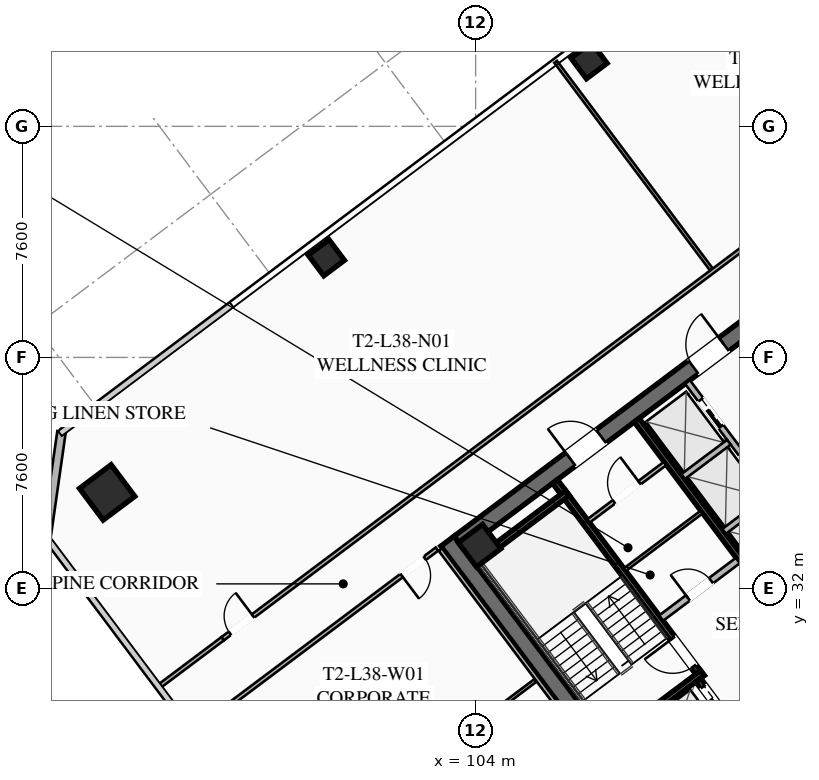
"""IFC4 building model, lengths in metres.
Left out: names, types, materials, properties, quantities, classifications, styles, units other than length and angle.
Written with IfcOpenShell. Run it as: python <this file> out.ifc"""

import sys

from ifc_helpers import new_model, si_unit, direction, frame, frame_2d, origin, origin_2d, place, context, subcontext, project, spatial, rectangle, hollow_rectangle, extrude, element, fill, save


model = new_model("IFC4")
c1 = context("Model", 3, precision=1e-05, world=origin(), true_north=direction((0.0, 1.0)))
c2 = subcontext(c1, "Body", "Model", "MODEL_VIEW")
j1 = project(units=[si_unit("LENGTHUNIT", "METRE"), si_unit("PLANEANGLEUNIT", "RADIAN")], contexts=[c1])
p1 = place(None, origin())
s1 = spatial("IfcSite", under=j1, at=p1, CompositionType="ELEMENT")
p2 = place(p1, origin())
s2 = spatial("IfcBuilding", under=s1, at=p2, CompositionType="ELEMENT")
p3 = place(p2, frame((0.0, 0.0, 142.8)))
s3 = spatial("IfcBuildingStorey", under=s2, at=p3, CompositionType="ELEMENT", Elevation=142.8)
p4 = place(p3, frame((112.436, 21.077, 0.0), z_axis=(0.0, 0.0, 1.0), x_axis=(-0.600005007985, 0.799996243986, 0.0)))
e1 = element("IfcWall", 1, at=p4, inside=s3, PredefinedType="SHEAR", context=c2, shape_type="SweptSolid", body=[
    extrude(rectangle(XDim=15.6, YDim=0.55, at=frame_2d((7.8, 0.0))), origin(), (0.0, 0.0, 1.0), 3.55),
])
p5 = place(p3, frame((124.539, 30.498, 0.0), z_axis=(0.0, 0.0, 1.0), x_axis=(-0.799998054672, -0.600002593761, 0.0)))
e2 = element("IfcWall", 2, at=p5, inside=s3, PredefinedType="SHEAR", context=c2, shape_type="SweptSolid", body=[
    extrude(rectangle(XDim=15.06, YDim=0.55, at=frame_2d((7.53, 0.0))), origin(), (0.0, 0.0, 1.0), 3.55),
])
p6 = place(p5, frame((9.23, 0.0, 0.0)))
e3 = element("IfcOpeningElement", 3, at=p6, cuts=e2, PredefinedType="OPENING", context=c2, shape_type="SweptSolid", body=[
    extrude(rectangle(XDim=1.25, YDim=2.25, at=frame_2d((0.625, 1.125))), frame((0.0, 0.285, 0.0), z_axis=(0.0, -1.0, 0.0), x_axis=(1.0, 0.0, 0.0)), (0.0, 0.0, 1.0), 0.57),
])
p7 = place(p5, frame((4.18, 0.0, 0.0)))
e4 = element("IfcOpeningElement", 4, at=p7, cuts=e2, PredefinedType="OPENING", context=c2, shape_type="SweptSolid", body=[
    extrude(rectangle(XDim=1.25, YDim=2.25, at=frame_2d((0.625, 1.125))), frame((0.0, 0.285, 0.0), z_axis=(0.0, -1.0, 0.0), x_axis=(1.0, 0.0, 0.0)), (0.0, 0.0, 1.0), 0.57),
])
p8 = place(p3, frame((103.461, 33.502, 0.0), z_axis=(0.0, 0.0, 1.0), x_axis=(0.799998054672, 0.600002593761, 0.0)))
e5 = element("IfcWall", 5, at=p8, inside=s3, PredefinedType="SHEAR", context=c2, shape_type="SweptSolid", body=[
    extrude(rectangle(XDim=15.06, YDim=0.55, at=frame_2d((7.53, 0.0))), origin(), (0.0, 0.0, 1.0), 3.55),
])
p9 = place(p8, frame((4.58, 0.0, 0.0)))
e6 = element("IfcOpeningElement", 6, at=p9, cuts=e5, PredefinedType="OPENING", context=c2, shape_type="SweptSolid", body=[
    extrude(rectangle(XDim=1.25, YDim=2.25, at=frame_2d((0.625, 1.125))), frame((0.0, 0.285, 0.0), z_axis=(0.0, -1.0, 0.0), x_axis=(1.0, 0.0, 0.0)), (0.0, 0.0, 1.0), 0.57),
])
p10 = place(p8, frame((9.63, 0.0, 0.0)))
e7 = element("IfcOpeningElement", 7, at=p10, cuts=e5, PredefinedType="OPENING", context=c2, shape_type="SweptSolid", body=[
    extrude(rectangle(XDim=1.25, YDim=2.25, at=frame_2d((0.625, 1.125))), frame((0.0, 0.285, 0.0), z_axis=(0.0, -1.0, 0.0), x_axis=(1.0, 0.0, 0.0)), (0.0, 0.0, 1.0), 0.57),
])
p11 = place(p3, frame((104.13, 33.41, 0.0), z_axis=(0.0, 0.0, 1.0), x_axis=(0.799999996291, 0.600000004945, 0.0)))
e8 = element("IfcColumn", 8, at=p11, inside=s3, PredefinedType="COLUMN", context=c2, shape_type="SweptSolid", body=[
    extrude(hollow_rectangle(XDim=1.0, YDim=1.0, WallThickness=0.04, at=origin_2d()), origin(), (0.0, 0.0, 1.0), 3.37),
])
p12 = place(p3, frame((91.88, 35.16, 0.0), z_axis=(0.0, 0.0, 1.0), x_axis=(0.799999996291, 0.600000004945, 0.0)))
e9 = element("IfcColumn", 9, at=p12, inside=s3, PredefinedType="COLUMN", context=c2, shape_type="SweptSolid", body=[
    extrude(hollow_rectangle(XDim=1.3, YDim=1.3, WallThickness=0.05, at=origin_2d()), origin(), (0.0, 0.0, 1.0), 3.37),
])
for number, where, z_axis, x_axis in (
    (10, (107.73, 49.36, 0.0), (0.0, 0.0, 1.0), (0.8, 0.6, 0.0)),
    (11, (99.09, 42.88, 0.0), (0.0, 0.0, 1.0), (0.8, 0.6, 0.0)),
):
    element("IfcColumn", number, at=place(p3, frame(where, z_axis=z_axis, x_axis=x_axis)), inside=s3, PredefinedType="COLUMN", context=c2, shape_type="SweptSolid", body=[
        extrude(hollow_rectangle(XDim=0.85, YDim=0.85, WallThickness=0.035, at=origin_2d()), origin(), (0.0, 0.0, 1.0), 3.37),
    ])
p13 = place(p3, frame((89.88, 33.66, 0.0), z_axis=(0.0, 0.0, 1.0), x_axis=(0.141421356237, 0.989949493661, 0.0)))
e12 = element("IfcWall", 12, at=p13, inside=s3, PredefinedType="SOLIDWALL", context=c2, shape_type="SweptSolid", body=[
    extrude(rectangle(XDim=3.536, YDim=0.28, at=frame_2d((1.768, 0.0))), origin(), (0.0, 0.0, 1.0), 3.37),
])
p14 = place(p3, frame((111.44, 29.08, 0.0), z_axis=(0.0, 0.0, 1.0), x_axis=(-0.59999029481, 0.8000072788, 0.0)))
e13 = element("IfcWall", 13, at=p14, inside=s3, PredefinedType="SHEAR", context=c2, shape_type="SweptSolid", body=[
    extrude(rectangle(XDim=8.05, YDim=0.2, at=frame_2d((4.025, 0.0))), origin(), (0.0, 0.0, 1.0), 3.37),
])
p15 = place(p14, frame((0.45, 0.0, 0.0)))
e14 = element("IfcOpeningElement", 14, at=p15, cuts=e13, PredefinedType="OPENING", context=c2, shape_type="SweptSolid", body=[
    extrude(rectangle(XDim=1.15, YDim=2.2, at=frame_2d((0.575, 1.1))), frame((0.0, 0.11, 0.0), z_axis=(0.0, -1.0, 0.0), x_axis=(1.0, 0.0, 0.0)), (0.0, 0.0, 1.0), 0.22),
])
for number, where, z_axis, x_axis in (
    (15, (108.396, 26.922, 0.0), (0.0, 0.0, 1.0), (0.8, 0.6, 0.0)),
    (16, (103.956, 32.842, 0.0), (0.0, 0.0, 1.0), (0.8, 0.6, 0.0)),
):
    element("IfcWall", number, at=place(p3, frame(where, z_axis=z_axis, x_axis=x_axis)), inside=s3, PredefinedType="SHEAR", context=c2, shape_type="SweptSolid", body=[
        extrude(rectangle(XDim=3.83, YDim=0.2, at=frame_2d((1.915, 0.0))), origin(), (0.0, 0.0, 1.0), 3.37),
    ])
p16 = place(p3, frame((117.998, 25.936, 0.0), z_axis=(0.0, 0.0, 1.0), x_axis=(-0.600002693989, 0.799997979501, 0.0)))
e17 = element("IfcWall", 17, at=p16, inside=s3, PredefinedType="SHEAR", context=c2, shape_type="SweptSolid", body=[
    extrude(rectangle(XDim=14.5, YDim=0.2, at=frame_2d((7.25, 0.0))), origin(), (0.0, 0.0, 1.0), 3.37),
])
p17 = place(p3, frame((110.104, 31.028, 0.0), z_axis=(0.0, 0.0, 1.0), x_axis=(0.800018601094, 0.59997519774, 0.0)))
e18 = element("IfcWall", 18, at=p17, inside=s3, PredefinedType="SOLIDWALL", context=c2, shape_type="SweptSolid", body=[
    extrude(rectangle(XDim=3.15, YDim=0.22, at=frame_2d((1.575, 0.0))), origin(), (0.0, 0.0, 1.0), 2.723),
])
p18 = place(p17, frame((1.1, 0.0, 0.0)))
e19 = element("IfcOpeningElement", 19, at=p18, cuts=e18, PredefinedType="OPENING", context=c2, shape_type="SweptSolid", body=[
    extrude(rectangle(XDim=0.95, YDim=2.05, at=frame_2d((0.475, 1.025))), frame((0.0, 0.12, 0.0), z_axis=(0.0, -1.0, 0.0), x_axis=(1.0, 0.0, 0.0)), (0.0, 0.0, 1.0), 0.24),
])
p19 = place(p3, frame((115.19, 23.83, 0.0), z_axis=(0.0, 0.0, 1.0), x_axis=(-0.599993943644, 0.800004542231, 0.0)))
e20 = element("IfcWall", 20, at=p19, inside=s3, PredefinedType="SHEAR", context=c2, shape_type="SweptSolid", body=[
    extrude(rectangle(XDim=6.45, YDim=0.2, at=frame_2d((3.225, 0.0))), origin(), (0.0, 0.0, 1.0), 3.37),
])
p20 = place(p19, frame((4.875, 0.0, 0.0)))
e21 = element("IfcOpeningElement", 21, at=p20, cuts=e20, PredefinedType="OPENING", context=c2, shape_type="SweptSolid", body=[
    extrude(rectangle(XDim=1.3, YDim=2.25, at=frame_2d((0.65, 1.125))), frame((0.0, 0.11, 0.0), z_axis=(0.0, -1.0, 0.0), x_axis=(1.0, 0.0, 0.0)), (0.0, 0.0, 1.0), 0.22),
])
p21 = place(p19, frame((2.875, 0.0, 0.0)))
e22 = element("IfcOpeningElement", 22, at=p21, cuts=e20, PredefinedType="OPENING", context=c2, shape_type="SweptSolid", body=[
    extrude(rectangle(XDim=1.3, YDim=2.25, at=frame_2d((0.65, 1.125))), frame((0.0, 0.11, 0.0), z_axis=(0.0, -1.0, 0.0), x_axis=(1.0, 0.0, 0.0)), (0.0, 0.0, 1.0), 0.22),
])
p22 = place(p19, frame((0.675, 0.0, 0.0)))
e23 = element("IfcOpeningElement", 23, at=p22, cuts=e20, PredefinedType="OPENING", context=c2, shape_type="SweptSolid", body=[
    extrude(rectangle(XDim=1.3, YDim=2.25, at=frame_2d((0.65, 1.125))), frame((0.0, 0.11, 0.0), z_axis=(0.0, -1.0, 0.0), x_axis=(1.0, 0.0, 0.0)), (0.0, 0.0, 1.0), 0.22),
])
p23 = place(p3, frame((107.71, 34.22, 0.0), z_axis=(0.0, 0.0, 1.0), x_axis=(0.799981399002, 0.60002480053, 0.0)))
e24 = element("IfcWall", 24, at=p23, inside=s3, PredefinedType="PARTITIONING", context=c2, shape_type="SweptSolid", body=[
    extrude(rectangle(XDim=3.15, YDim=0.135, at=frame_2d((1.575, 0.0))), origin(), (0.0, 0.0, 1.0), 2.723),
])
p24 = place(p23, frame((1.05, 0.0, 0.0)))
e25 = element("IfcOpeningElement", 25, at=p24, cuts=e24, PredefinedType="OPENING", context=c2, shape_type="SweptSolid", body=[
    extrude(rectangle(XDim=1.05, YDim=2.2, at=frame_2d((0.525, 1.1))), frame((0.0, 0.077, 0.0), z_axis=(0.0, -1.0, 0.0), x_axis=(1.0, 0.0, 0.0)), (0.0, 0.0, 1.0), 0.155),
])
p25 = place(p3, frame((108.91, 32.62, 0.0), z_axis=(0.0, 0.0, 1.0), x_axis=(0.800018601094, 0.59997519774, 0.0)))
e26 = element("IfcWall", 26, at=p25, inside=s3, PredefinedType="PARTITIONING", context=c2, shape_type="SweptSolid", body=[
    extrude(rectangle(XDim=3.15, YDim=0.11, at=frame_2d((1.575, 0.0))), origin(), (0.0, 0.0, 1.0), 2.723),
])
p26 = place(p3, frame((115.11, 33.27, 0.0), z_axis=(0.0, 0.0, 1.0), x_axis=(-0.600011322243, 0.799991508192, 0.0)))
e27 = element("IfcWall", 27, at=p26, inside=s3, PredefinedType="SOLIDWALL", context=c2, shape_type="SweptSolid", body=[
    extrude(rectangle(XDim=6.9, YDim=0.2, at=frame_2d((3.45, 0.0))), origin(), (0.0, 0.0, 1.0), 3.37),
])
p27 = place(p26, frame((0.575, 0.0, 0.0)))
e28 = element("IfcOpeningElement", 28, at=p27, cuts=e27, PredefinedType="OPENING", context=c2, shape_type="SweptSolid", body=[
    extrude(rectangle(XDim=1.1, YDim=2.2, at=frame_2d((0.55, 1.1))), frame((0.0, 0.11, 0.0), z_axis=(0.0, -1.0, 0.0), x_axis=(1.0, 0.0, 0.0)), (0.0, 0.0, 1.0), 0.22),
])
p28 = place(p26, frame((2.825, 0.0, 0.0)))
e29 = element("IfcOpeningElement", 29, at=p28, cuts=e27, PredefinedType="OPENING", context=c2, shape_type="SweptSolid", body=[
    extrude(rectangle(XDim=1.1, YDim=2.2, at=frame_2d((0.55, 1.1))), frame((0.0, 0.11, 0.0), z_axis=(0.0, -1.0, 0.0), x_axis=(1.0, 0.0, 0.0)), (0.0, 0.0, 1.0), 0.22),
])
p29 = place(p26, frame((5.075, 0.0, 0.0)))
e30 = element("IfcOpeningElement", 30, at=p29, cuts=e27, PredefinedType="OPENING", context=c2, shape_type="SweptSolid", body=[
    extrude(rectangle(XDim=1.1, YDim=2.2, at=frame_2d((0.55, 1.1))), frame((0.0, 0.11, 0.0), z_axis=(0.0, -1.0, 0.0), x_axis=(1.0, 0.0, 0.0)), (0.0, 0.0, 1.0), 0.22),
])
p30 = place(p3, frame((112.176, 33.882, 0.0), z_axis=(0.0, 0.0, 1.0), x_axis=(0.8, 0.6, 0.0)))
e31 = element("IfcWall", 31, at=p30, inside=s3, PredefinedType="SOLIDWALL", context=c2, shape_type="SweptSolid", body=[
    extrude(rectangle(XDim=1.88, YDim=0.2, at=frame_2d((0.94, 0.0))), origin(), (0.0, 0.0, 1.0), 3.37),
])
p31 = place(p3, frame((110.826, 35.682, 0.0), z_axis=(0.0, 0.0, 1.0), x_axis=(0.799984418148, 0.600020775241, 0.0)))
e32 = element("IfcWall", 32, at=p31, inside=s3, PredefinedType="SOLIDWALL", context=c2, shape_type="SweptSolid", body=[
    extrude(rectangle(XDim=1.88, YDim=0.2, at=frame_2d((0.94, 0.0))), origin(), (0.0, 0.0, 1.0), 3.37),
])
p32 = place(p3, frame((95.678, 30.346, 0.0), z_axis=(0.0, 0.0, 1.0), x_axis=(0.8, 0.6, 0.0)))
e33 = element("IfcWall", 33, at=p32, inside=s3, PredefinedType="PARTITIONING", context=c2, shape_type="SweptSolid", body=[
    extrude(rectangle(XDim=31.3, YDim=0.135, at=frame_2d((15.65, 0.0))), origin(), (0.0, 0.0, 1.0), 2.723),
])
p33 = place(p32, frame((0.3, 0.0, 0.0)))
e34 = element("IfcOpeningElement", 34, at=p33, cuts=e33, PredefinedType="OPENING", context=c2, shape_type="SweptSolid", body=[
    extrude(rectangle(XDim=0.95, YDim=2.05, at=frame_2d((0.475, 1.025))), frame((0.0, 0.077, 0.0), z_axis=(0.0, -1.0, 0.0), x_axis=(1.0, 0.0, 0.0)), (0.0, 0.0, 1.0), 0.155),
])
p34 = place(p32, frame((30.05, 0.0, 0.0)))
e35 = element("IfcOpeningElement", 35, at=p34, cuts=e33, PredefinedType="OPENING", context=c2, shape_type="SweptSolid", body=[
    extrude(rectangle(XDim=0.95, YDim=2.05, at=frame_2d((0.475, 1.025))), frame((0.0, 0.077, 0.0), z_axis=(0.0, -1.0, 0.0), x_axis=(1.0, 0.0, 0.0)), (0.0, 0.0, 1.0), 0.155),
])
p35 = place(p3, frame((93.574, 28.768, 0.0), z_axis=(0.0, 0.0, 1.0), x_axis=(0.80002227902, 0.599970293491, 0.0)))
e36 = element("IfcWall", 36, at=p35, inside=s3, PredefinedType="PARTITIONING", context=c2, shape_type="SweptSolid", body=[
    extrude(rectangle(XDim=2.63, YDim=0.135, at=frame_2d((1.315, 0.0))), origin(), (0.0, 0.0, 1.0), 2.723),
])
p36 = place(p3, frame((111.75, 42.5, 0.0), z_axis=(0.0, 0.0, 1.0), x_axis=(-0.599995420528, 0.800003434584, 0.0)))
e37 = element("IfcWall", 37, at=p36, inside=s3, PredefinedType="PARTITIONING", context=c2, shape_type="SweptSolid", body=[
    extrude(rectangle(XDim=8.53, YDim=0.11, at=frame_2d((4.265, 0.0))), origin(), (0.0, 0.0, 1.0), 2.723),
])
p37 = place(p3, frame((132.13, 33.91, 0.0), z_axis=(0.0, 0.0, 1.0), x_axis=(-0.799997191971, -0.600003744021, 0.0)))
e38 = element("IfcWall", 38, at=p37, inside=s3, PredefinedType="PARTITIONING", context=c2, shape_type="SweptSolid", body=[
    extrude(rectangle(XDim=31.3, YDim=0.135, at=frame_2d((15.65, 0.0))), origin(), (0.0, 0.0, 1.0), 2.723),
])
p38 = place(p37, frame((29.97, 0.0, 0.0)))
e39 = element("IfcOpeningElement", 39, at=p38, cuts=e38, PredefinedType="OPENING", context=c2, shape_type="SweptSolid", body=[
    extrude(rectangle(XDim=0.95, YDim=2.05, at=frame_2d((0.475, 1.025))), frame((0.0, 0.077, 0.0), z_axis=(0.0, -1.0, 0.0), x_axis=(1.0, 0.0, 0.0)), (0.0, 0.0, 1.0), 0.155),
])
p39 = place(p37, frame((0.38, 0.0, 0.0)))
e40 = element("IfcOpeningElement", 40, at=p39, cuts=e38, PredefinedType="OPENING", context=c2, shape_type="SweptSolid", body=[
    extrude(rectangle(XDim=0.95, YDim=2.05, at=frame_2d((0.475, 1.025))), frame((0.0, 0.077, 0.0), z_axis=(0.0, -1.0, 0.0), x_axis=(1.0, 0.0, 0.0)), (0.0, 0.0, 1.0), 0.155),
])
p40 = place(p3, frame((112.104, 20.928, 0.0), z_axis=(0.0, 0.0, 1.0), x_axis=(-0.599994940075, 0.800003794918, 0.0)))
e41 = element("IfcWall", 41, at=p40, inside=s3, PredefinedType="PARTITIONING", context=c2, shape_type="SweptSolid", body=[
    extrude(rectangle(XDim=15.44, YDim=0.135, at=frame_2d((7.72, 0.0))), origin(), (0.0, 0.0, 1.0), 2.723),
])
p41 = place(p3, frame((102.728, 33.296, 0.0), z_axis=(0.0, 0.0, 1.0), x_axis=(-0.800011848946, -0.599984201081, 0.0)))
e42 = element("IfcWall", 42, at=p41, inside=s3, PredefinedType="PARTITIONING", context=c2, shape_type="SweptSolid", body=[
    extrude(rectangle(XDim=9.89, YDim=0.135, at=frame_2d((4.945, 0.0))), origin(), (0.0, 0.0, 1.0), 2.723),
])
p42 = place(p41, frame((0.5, 0.0, 0.0)))
e43 = element("IfcOpeningElement", 43, at=p42, cuts=e42, PredefinedType="OPENING", context=c2, shape_type="SweptSolid", body=[
    extrude(rectangle(XDim=0.95, YDim=2.05, at=frame_2d((0.475, 1.025))), frame((0.0, 0.077, 0.0), z_axis=(0.0, -1.0, 0.0), x_axis=(1.0, 0.0, 0.0)), (0.0, 0.0, 1.0), 0.155),
])
p43 = place(p3, frame((98.056, 23.042, 0.0), z_axis=(0.0, 0.0, 1.0), x_axis=(0.8, 0.6, 0.0)))
e44 = element("IfcWall", 44, at=p43, inside=s3, PredefinedType="PARTITIONING", context=c2, shape_type="SweptSolid", body=[
    extrude(rectangle(XDim=9.89, YDim=0.11, at=frame_2d((4.945, 0.0))), origin(), (0.0, 0.0, 1.0), 2.723),
])
p44 = place(p9, origin())
e45 = element("IfcDoor", 45, at=p44, inside=s3, OperationType="SINGLE_SWING_LEFT", PredefinedType="DOOR", context=c2, shape_type="SweptSolid", body=[
    extrude(rectangle(XDim=1.25, YDim=2.25, at=frame_2d((0.625, 1.125))), frame((0.0, 0.025, 0.0), z_axis=(0.0, -1.0, 0.0), x_axis=(1.0, 0.0, 0.0)), (0.0, 0.0, 1.0), 0.05),
])
fill(e6, e45)
p45 = place(p10, origin())
e46 = element("IfcDoor", 46, at=p45, inside=s3, OperationType="SINGLE_SWING_RIGHT", PredefinedType="DOOR", context=c2, shape_type="SweptSolid", body=[
    extrude(rectangle(XDim=1.25, YDim=2.25, at=frame_2d((0.625, 1.125))), frame((0.0, 0.025, 0.0), z_axis=(0.0, -1.0, 0.0), x_axis=(1.0, 0.0, 0.0)), (0.0, 0.0, 1.0), 0.05),
])
fill(e7, e46)
p46 = place(p15, origin())
e47 = element("IfcDoor", 47, at=p46, inside=s3, OperationType="SINGLE_SWING_RIGHT", PredefinedType="DOOR", context=c2, shape_type="SweptSolid", body=[
    extrude(rectangle(XDim=1.15, YDim=2.2, at=frame_2d((0.575, 1.1))), frame((0.0, 0.025, 0.0), z_axis=(0.0, -1.0, 0.0), x_axis=(1.0, 0.0, 0.0)), (0.0, 0.0, 1.0), 0.05),
])
fill(e14, e47)
p47 = place(p24, origin())
e48 = element("IfcDoor", 48, at=p47, inside=s3, OperationType="SINGLE_SWING_RIGHT", PredefinedType="DOOR", context=c2, shape_type="SweptSolid", body=[
    extrude(rectangle(XDim=1.05, YDim=2.2, at=frame_2d((0.525, 1.1))), frame((0.0, 0.025, 0.0), z_axis=(0.0, -1.0, 0.0), x_axis=(1.0, 0.0, 0.0)), (0.0, 0.0, 1.0), 0.05),
])
fill(e25, e48)
p48 = place(p18, origin())
e49 = element("IfcDoor", 49, at=p48, inside=s3, OperationType="SINGLE_SWING_LEFT", PredefinedType="DOOR", context=c2, shape_type="SweptSolid", body=[
    extrude(rectangle(XDim=0.95, YDim=2.05, at=frame_2d((0.475, 1.025))), frame((0.0, 0.025, 0.0), z_axis=(0.0, -1.0, 0.0), x_axis=(1.0, 0.0, 0.0)), (0.0, 0.0, 1.0), 0.05),
])
fill(e19, e49)
p49 = place(p33, origin())
e50 = element("IfcDoor", 50, at=p49, inside=s3, OperationType="SINGLE_SWING_RIGHT", PredefinedType="DOOR", context=c2, shape_type="SweptSolid", body=[
    extrude(rectangle(XDim=0.95, YDim=2.05, at=frame_2d((0.475, 1.025))), frame((0.0, 0.025, 0.0), z_axis=(0.0, -1.0, 0.0), x_axis=(1.0, 0.0, 0.0)), (0.0, 0.0, 1.0), 0.05),
])
fill(e34, e50)
p50 = place(p42, origin())
e51 = element("IfcDoor", 51, at=p50, inside=s3, OperationType="SINGLE_SWING_RIGHT", PredefinedType="DOOR", context=c2, shape_type="SweptSolid", body=[
    extrude(rectangle(XDim=0.95, YDim=2.05, at=frame_2d((0.475, 1.025))), frame((0.0, 0.025, 0.0), z_axis=(0.0, -1.0, 0.0), x_axis=(1.0, 0.0, 0.0)), (0.0, 0.0, 1.0), 0.05),
])
fill(e43, e51)
p51 = place(p20, origin())
e52 = element("IfcDoor", 52, at=p51, inside=s3, OperationType="SLIDING_TO_LEFT", PredefinedType="DOOR", context=c2, shape_type="SweptSolid", body=[
    extrude(rectangle(XDim=1.3, YDim=2.25, at=frame_2d((0.65, 1.125))), frame((0.0, 0.025, 0.0), z_axis=(0.0, -1.0, 0.0), x_axis=(1.0, 0.0, 0.0)), (0.0, 0.0, 1.0), 0.05),
])
fill(e21, e52)
p52 = place(p29, origin())
e53 = element("IfcDoor", 53, at=p52, inside=s3, OperationType="SLIDING_TO_LEFT", PredefinedType="DOOR", context=c2, shape_type="SweptSolid", body=[
    extrude(rectangle(XDim=1.1, YDim=2.2, at=frame_2d((0.55, 1.1))), frame((0.0, 0.025, 0.0), z_axis=(0.0, -1.0, 0.0), x_axis=(1.0, 0.0, 0.0)), (0.0, 0.0, 1.0), 0.05),
])
fill(e30, e53)
save(model, sys.argv[1])
